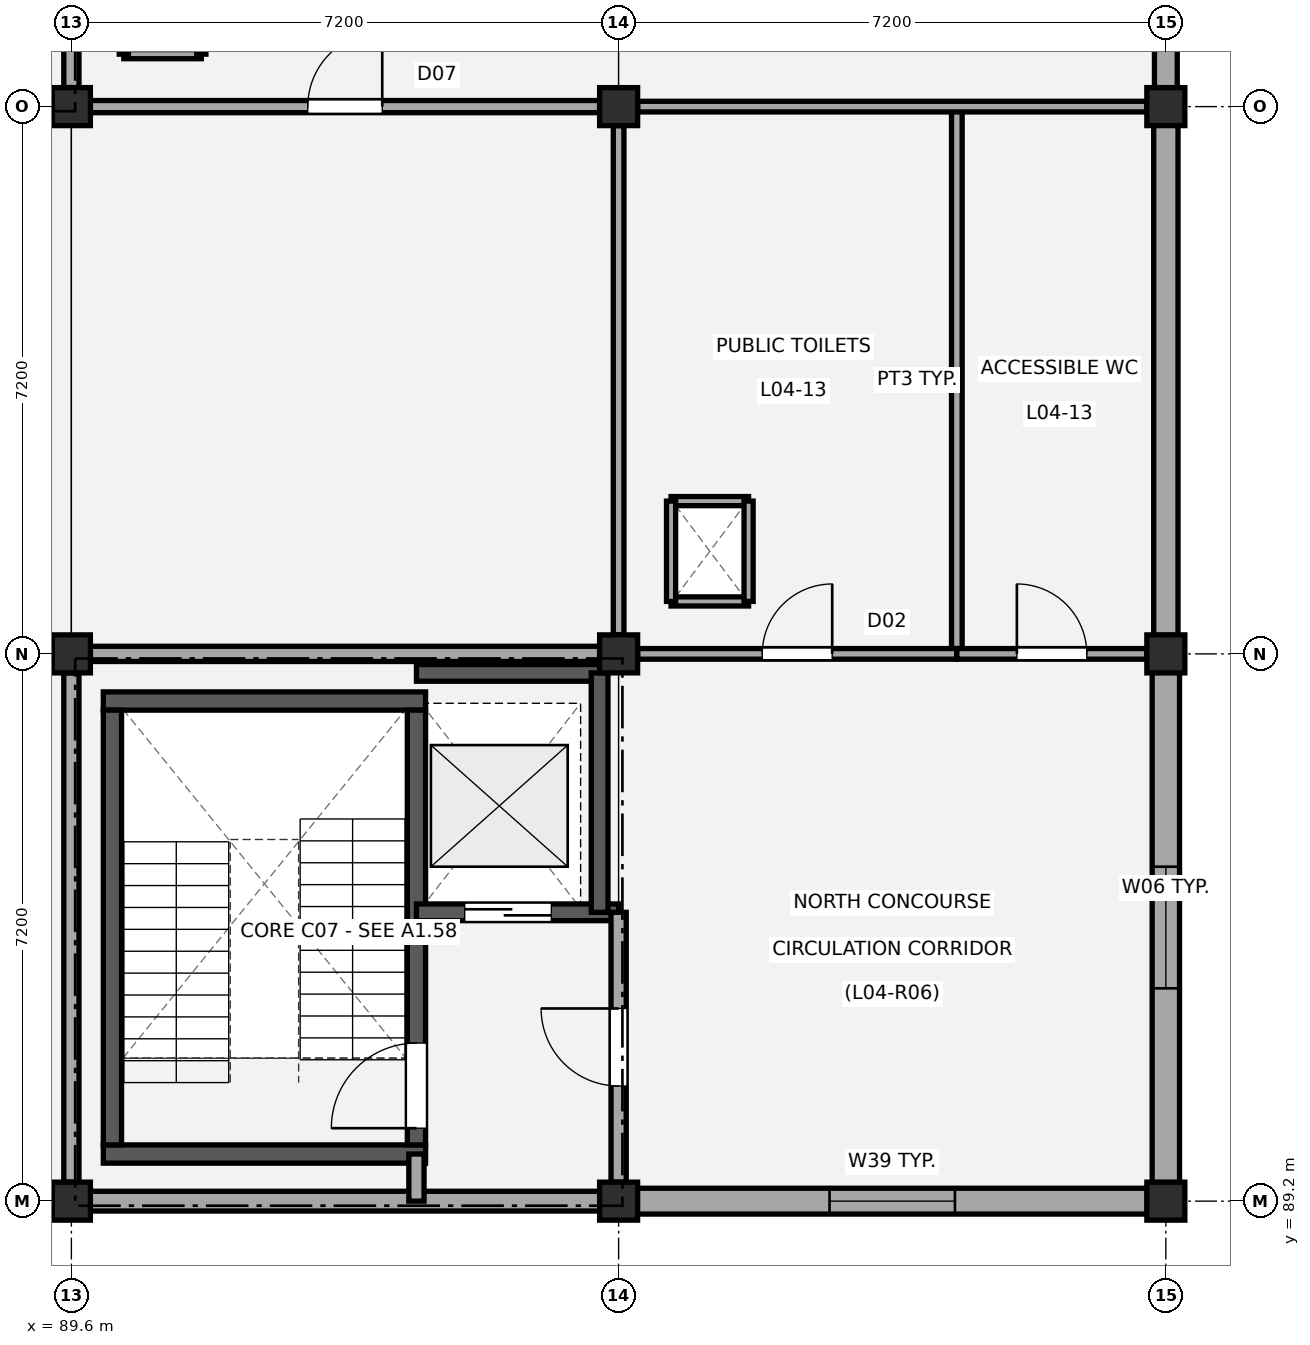
"""IFC4 building model, lengths in metres.
Left out: names, types, materials, properties, quantities, classifications, styles, units other than length and angle.
Written with IfcOpenShell. Run it as: python <this file> out.ifc"""

import sys

from ifc_helpers import new_model, si_unit, direction, frame, frame_2d, origin, origin_2d, place, context, subcontext, project, spatial, rectangle, extrude, element, fill, save


model = new_model("IFC4")
c1 = context("Model", 3, precision=1e-05, world=origin(), true_north=direction((0.0, 1.0)))
c2 = subcontext(c1, "Body", "Model", "MODEL_VIEW")
j1 = project(units=[si_unit("LENGTHUNIT", "METRE"), si_unit("PLANEANGLEUNIT", "RADIAN")], contexts=[c1])
p1 = place(None, origin())
s1 = spatial("IfcSite", under=j1, at=p1, CompositionType="ELEMENT")
p2 = place(p1, origin())
s2 = spatial("IfcBuilding", under=s1, at=p2, CompositionType="ELEMENT")
p3 = place(p2, frame((0.0, 0.0, 17.64)))
s3 = spatial("IfcBuildingStorey", under=s2, at=p3, CompositionType="ELEMENT", Elevation=17.64)
for number, where, z_axis, x_axis in (
    (1, (89.6, 89.2, 0.0), (0.0, 0.0, 1.0), (1.0, 0.0, 0.0)),
    (2, (89.6, 96.4, 0.0), (0.0, 0.0, 1.0), (1.0, 0.0, 0.0)),
    (3, (89.6, 103.6, 0.0), (0.0, 0.0, 1.0), (1.0, 0.0, 0.0)),
    (4, (96.8, 89.2, 0.0), (0.0, 0.0, 1.0), (1.0, 0.0, 0.0)),
    (5, (96.8, 96.4, 0.0), (0.0, 0.0, 1.0), (1.0, 0.0, 0.0)),
    (6, (96.8, 103.6, 0.0), (0.0, 0.0, 1.0), (1.0, 0.0, 0.0)),
    (7, (104.0, 89.2, 0.0), (0.0, 0.0, 1.0), (1.0, 0.0, 0.0)),
    (8, (104.0, 96.4, 0.0), (0.0, 0.0, 1.0), (1.0, 0.0, 0.0)),
    (9, (104.0, 103.6, 0.0), (0.0, 0.0, 1.0), (1.0, 0.0, 0.0)),
):
    element("IfcColumn", number, at=place(p3, frame(where, z_axis=z_axis, x_axis=x_axis)), inside=s3, PredefinedType="COLUMN", context=c2, shape_type="SweptSolid", body=[
        extrude(rectangle(XDim=0.5, YDim=0.5, at=origin_2d()), origin(), (0.0, 0.0, 1.0), 3.96),
    ])
p4 = place(p3, frame((89.355, 89.2, 0.0), z_axis=(0.0, 0.0, 1.0), x_axis=(-1.0, 0.0, 0.0)))
e10 = element("IfcWall", 10, at=p4, inside=s3, PredefinedType="STANDARD", context=c2, shape_type="SweptSolid", body=[
    extrude(rectangle(XDim=6.71, YDim=0.28, at=frame_2d((3.355, 0.0))), origin(), (0.0, 0.0, 1.0), 3.14),
])
p5 = place(p4, frame((2.63, 0.0, 0.95)))
e11 = element("IfcOpeningElement", 11, at=p5, cuts=e10, PredefinedType="OPENING", context=c2, shape_type="SweptSolid", body=[
    extrude(rectangle(XDim=1.45, YDim=1.8, at=frame_2d((0.725, 0.9))), frame((0.0, 0.15, 0.0), z_axis=(0.0, -1.0, 0.0), x_axis=(1.0, 0.0, 0.0)), (0.0, 0.0, 1.0), 0.3),
])
p6 = place(p3, frame((96.555, 89.2, 0.0), z_axis=(0.0, 0.0, 1.0), x_axis=(-1.0, 0.0, 0.0)))
e12 = element("IfcWall", 12, at=p6, inside=s3, PredefinedType="STANDARD", context=c2, shape_type="SweptSolid", body=[
    extrude(rectangle(XDim=6.71, YDim=0.26, at=frame_2d((3.355, 0.0))), origin(), (0.0, 0.0, 1.0), 3.12),
])
p7 = place(p3, frame((103.755, 89.2, 0.0), z_axis=(0.0, 0.0, 1.0), x_axis=(-1.0, 0.0, 0.0)))
e13 = element("IfcWall", 13, at=p7, inside=s3, PredefinedType="STANDARD", context=c2, shape_type="SweptSolid", body=[
    extrude(rectangle(XDim=6.71, YDim=0.34, at=frame_2d((3.355, 0.0))), origin(), (0.0, 0.0, 1.0), 3.14),
])
p8 = place(p7, frame((2.53, 0.0, 0.95)))
e14 = element("IfcOpeningElement", 14, at=p8, cuts=e13, PredefinedType="OPENING", context=c2, shape_type="SweptSolid", body=[
    extrude(rectangle(XDim=1.65, YDim=1.85, at=frame_2d((0.825, 0.925))), frame((0.0, 0.18, 0.0), z_axis=(0.0, -1.0, 0.0), x_axis=(1.0, 0.0, 0.0)), (0.0, 0.0, 1.0), 0.36),
])
p9 = place(p3, frame((104.0, 96.155, 0.0), z_axis=(0.0, 0.0, 1.0), x_axis=(0.0, -1.0, 0.0)))
e15 = element("IfcWall", 15, at=p9, inside=s3, PredefinedType="STANDARD", context=c2, shape_type="SweptSolid", body=[
    extrude(rectangle(XDim=6.71, YDim=0.36, at=frame_2d((3.355, 0.0))), origin(), (0.0, 0.0, 1.0), 3.14),
])
p10 = place(p9, frame((2.555, 0.0, 0.95)))
e16 = element("IfcOpeningElement", 16, at=p10, cuts=e15, PredefinedType="OPENING", context=c2, shape_type="SweptSolid", body=[
    extrude(rectangle(XDim=1.6, YDim=1.7, at=frame_2d((0.8, 0.85))), frame((0.0, 0.19, 0.0), z_axis=(0.0, -1.0, 0.0), x_axis=(1.0, 0.0, 0.0)), (0.0, 0.0, 1.0), 0.38),
])
p11 = place(p3, frame((104.0, 103.355, 0.0), z_axis=(0.0, 0.0, 1.0), x_axis=(0.0, -1.0, 0.0)))
e17 = element("IfcWall", 17, at=p11, inside=s3, PredefinedType="STANDARD", context=c2, shape_type="SweptSolid", body=[
    extrude(rectangle(XDim=6.71, YDim=0.32, at=frame_2d((3.355, 0.0))), origin(), (0.0, 0.0, 1.0), 3.14),
])
p12 = place(p3, frame((104.0, 111.88, 0.0), z_axis=(0.0, 0.0, 1.0), x_axis=(0.0, -1.0, 0.0)))
e18 = element("IfcWall", 18, at=p12, inside=s3, PredefinedType="STANDARD", context=c2, shape_type="SweptSolid", body=[
    extrude(rectangle(XDim=8.035, YDim=0.3, at=frame_2d((4.018, 0.0))), origin(), (0.0, 0.0, 1.0), 3.14),
])
p13 = place(p12, frame((3.167, 0.0, 0.95)))
e19 = element("IfcOpeningElement", 19, at=p13, cuts=e18, PredefinedType="OPENING", context=c2, shape_type="SweptSolid", body=[
    extrude(rectangle(XDim=1.7, YDim=1.75, at=frame_2d((0.85, 0.875))), frame((0.0, 0.16, 0.0), z_axis=(0.0, -1.0, 0.0), x_axis=(1.0, 0.0, 0.0)), (0.0, 0.0, 1.0), 0.32),
])
p14 = place(p3, frame((89.6, 103.85, 0.0), z_axis=(0.0, 0.0, 1.0), x_axis=(0.0, 1.0, 0.0)))
e20 = element("IfcWall", 20, at=p14, inside=s3, PredefinedType="PARTITIONING", context=c2, shape_type="SweptSolid", body=[
    extrude(rectangle(XDim=3.55, YDim=0.2, at=frame_2d((1.775, 0.0))), origin(), (0.0, 0.0, 1.0), 3.02),
])
p15 = place(p3, frame((86.94, 103.6, 0.0), z_axis=(0.0, 0.0, 1.0), x_axis=(1.0, 0.0, 0.0)))
e21 = element("IfcWall", 21, at=p15, inside=s3, PredefinedType="PARTITIONING", context=c2, shape_type="SweptSolid", body=[
    extrude(rectangle(XDim=2.41, YDim=0.2, at=frame_2d((1.205, 0.0))), origin(), (0.0, 0.0, 1.0), 3.09),
])
p16 = place(p15, frame((0.695, 0.0, 0.0)))
e22 = element("IfcOpeningElement", 22, at=p16, cuts=e21, PredefinedType="OPENING", context=c2, shape_type="SweptSolid", body=[
    extrude(rectangle(XDim=1.02, YDim=2.15, at=frame_2d((0.51, 1.075))), frame((0.0, 0.11, 0.0), z_axis=(0.0, -1.0, 0.0), x_axis=(1.0, 0.0, 0.0)), (0.0, 0.0, 1.0), 0.22),
])
for number, where, z_axis, x_axis in (
    (23, (90.02, 89.82, 0.0), (0.0, 0.0, 1.0), (1.0, 0.0, 0.0)),
    (24, (90.02, 95.78, 0.0), (0.0, 0.0, 1.0), (1.0, 0.0, 0.0)),
):
    element("IfcWall", number, at=place(p3, frame(where, z_axis=z_axis, x_axis=x_axis)), inside=s3, PredefinedType="SHEAR", context=c2, shape_type="SweptSolid", body=[
        extrude(rectangle(XDim=4.24, YDim=0.24, at=frame_2d((2.12, 0.0))), origin(), (0.0, 0.0, 1.0), 3.68),
    ])
p17 = place(p3, frame((90.14, 89.94, 0.0), z_axis=(0.0, 0.0, 1.0), x_axis=(0.0, 1.0, 0.0)))
e25 = element("IfcWall", 25, at=p17, inside=s3, PredefinedType="SHEAR", context=c2, shape_type="SweptSolid", body=[
    extrude(rectangle(XDim=5.72, YDim=0.24, at=frame_2d((2.86, 0.0))), origin(), (0.0, 0.0, 1.0), 3.68),
])
p18 = place(p3, frame((94.14, 89.94, 0.0), z_axis=(0.0, 0.0, 1.0), x_axis=(0.0, 1.0, 0.0)))
e26 = element("IfcWall", 26, at=p18, inside=s3, PredefinedType="SHEAR", context=c2, shape_type="SweptSolid", body=[
    extrude(rectangle(XDim=5.72, YDim=0.24, at=frame_2d((2.86, 0.0))), origin(), (0.0, 0.0, 1.0), 3.68),
])
p19 = place(p18, frame((0.22, 0.0, 0.0)))
e27 = element("IfcOpeningElement", 27, at=p19, cuts=e26, PredefinedType="OPENING", context=c2, shape_type="SweptSolid", body=[
    extrude(rectangle(XDim=1.12, YDim=2.15, at=frame_2d((0.56, 1.075))), frame((0.0, 0.13, 0.0), z_axis=(0.0, -1.0, 0.0), x_axis=(1.0, 0.0, 0.0)), (0.0, 0.0, 1.0), 0.26),
])
p20 = place(p3, frame((94.14, 93.0, 0.0), z_axis=(0.0, 0.0, 1.0), x_axis=(1.0, 0.0, 0.0)))
e28 = element("IfcWall", 28, at=p20, inside=s3, PredefinedType="SHEAR", context=c2, shape_type="SweptSolid", body=[
    extrude(rectangle(XDim=2.66, YDim=0.22, at=frame_2d((1.33, 0.0))), origin(), (0.0, 0.0, 1.0), 3.68),
])
p21 = place(p20, frame((0.635, 0.0, 0.0)))
e29 = element("IfcOpeningElement", 29, at=p21, cuts=e28, PredefinedType="OPENING", context=c2, shape_type="SweptSolid", body=[
    extrude(rectangle(XDim=1.14, YDim=2.15, at=frame_2d((0.57, 1.075))), frame((0.0, 0.12, 0.0), z_axis=(0.0, -1.0, 0.0), x_axis=(1.0, 0.0, 0.0)), (0.0, 0.0, 1.0), 0.24),
])
p22 = place(p3, frame((94.14, 96.15, 0.0), z_axis=(0.0, 0.0, 1.0), x_axis=(1.0, 0.0, 0.0)))
e30 = element("IfcWall", 30, at=p22, inside=s3, PredefinedType="SHEAR", context=c2, shape_type="SweptSolid", body=[
    extrude(rectangle(XDim=2.41, YDim=0.22, at=frame_2d((1.205, 0.0))), origin(), (0.0, 0.0, 1.0), 3.68),
])
p23 = place(p3, frame((96.55, 93.0, 0.0), z_axis=(0.0, 0.0, 1.0), x_axis=(0.0, 1.0, 0.0)))
e31 = element("IfcWall", 31, at=p23, inside=s3, PredefinedType="SHEAR", context=c2, shape_type="SweptSolid", body=[
    extrude(rectangle(XDim=3.15, YDim=0.22, at=frame_2d((1.575, 0.0))), origin(), (0.0, 0.0, 1.0), 3.68),
])
p24 = place(p3, frame((94.14, 89.2, 0.0), z_axis=(0.0, 0.0, 1.0), x_axis=(0.0, 1.0, 0.0)))
e32 = element("IfcWall", 32, at=p24, inside=s3, PredefinedType="PARTITIONING", context=c2, shape_type="SweptSolid", body=[
    extrude(rectangle(XDim=0.62, YDim=0.2, at=frame_2d((0.31, 0.0))), origin(), (0.0, 0.0, 1.0), 3.12),
])
p25 = place(p3, frame((89.6, 89.45, 0.0), z_axis=(0.0, 0.0, 1.0), x_axis=(0.0, 1.0, 0.0)))
e33 = element("IfcWall", 33, at=p25, inside=s3, PredefinedType="PARTITIONING", context=c2, shape_type="SweptSolid", body=[
    extrude(rectangle(XDim=6.7, YDim=0.2, at=frame_2d((3.35, 0.0))), origin(), (0.0, 0.0, 1.0), 3.02),
])
p26 = place(p3, frame((96.8, 89.45, 0.0), z_axis=(0.0, 0.0, 1.0), x_axis=(0.0, 1.0, 0.0)))
e34 = element("IfcWall", 34, at=p26, inside=s3, PredefinedType="PARTITIONING", context=c2, shape_type="SweptSolid", body=[
    extrude(rectangle(XDim=3.55, YDim=0.2, at=frame_2d((1.775, 0.0))), origin(), (0.0, 0.0, 1.0), 3.02),
])
p27 = place(p26, frame((1.265, 0.0, 0.0)))
e35 = element("IfcOpeningElement", 35, at=p27, cuts=e34, PredefinedType="OPENING", context=c2, shape_type="SweptSolid", body=[
    extrude(rectangle(XDim=1.02, YDim=2.15, at=frame_2d((0.51, 1.075))), frame((0.0, 0.11, 0.0), z_axis=(0.0, -1.0, 0.0), x_axis=(1.0, 0.0, 0.0)), (0.0, 0.0, 1.0), 0.22),
])
p28 = place(p3, frame((89.85, 96.4, 0.0), z_axis=(0.0, 0.0, 1.0), x_axis=(1.0, 0.0, 0.0)))
e36 = element("IfcWall", 36, at=p28, inside=s3, PredefinedType="PARTITIONING", context=c2, shape_type="SweptSolid", body=[
    extrude(rectangle(XDim=6.7, YDim=0.2, at=frame_2d((3.35, 0.0))), origin(), (0.0, 0.0, 1.0), 3.07),
])
p29 = place(p3, frame((90.29, 104.29, 0.0), z_axis=(0.0, 0.0, 1.0), x_axis=(1.0, 0.0, 0.0)))
e37 = element("IfcWall", 37, at=p29, inside=s3, PredefinedType="PARTITIONING", context=c2, shape_type="SweptSolid", body=[
    extrude(rectangle(XDim=1.02, YDim=0.12, at=frame_2d((0.51, 0.0))), origin(), (0.0, 0.0, 1.0), 3.66),
])
for number, where, z_axis, x_axis in (
    (38, (90.29, 104.29, 0.0), (0.0, 0.0, 1.0), (0.0, 1.0, 0.0)),
    (39, (91.31, 104.29, 0.0), (0.0, 0.0, 1.0), (0.0, 1.0, 0.0)),
):
    element("IfcWall", number, at=place(p3, frame(where, z_axis=z_axis, x_axis=x_axis)), inside=s3, PredefinedType="PARTITIONING", context=c2, shape_type="SweptSolid", body=[
        extrude(rectangle(XDim=1.32, YDim=0.12, at=frame_2d((0.66, 0.0))), origin(), (0.0, 0.0, 1.0), 3.66),
    ])
for number, where, z_axis, x_axis in (
    (40, (97.49, 97.09, 0.0), (0.0, 0.0, 1.0), (1.0, 0.0, 0.0)),
    (41, (97.49, 98.41, 0.0), (0.0, 0.0, 1.0), (1.0, 0.0, 0.0)),
):
    element("IfcWall", number, at=place(p3, frame(where, z_axis=z_axis, x_axis=x_axis)), inside=s3, PredefinedType="PARTITIONING", context=c2, shape_type="SweptSolid", body=[
        extrude(rectangle(XDim=1.02, YDim=0.12, at=frame_2d((0.51, 0.0))), origin(), (0.0, 0.0, 1.0), 3.68),
    ])
for number, where, z_axis, x_axis in (
    (42, (97.49, 97.09, 0.0), (0.0, 0.0, 1.0), (0.0, 1.0, 0.0)),
    (43, (98.51, 97.09, 0.0), (0.0, 0.0, 1.0), (0.0, 1.0, 0.0)),
):
    element("IfcWall", number, at=place(p3, frame(where, z_axis=z_axis, x_axis=x_axis)), inside=s3, PredefinedType="PARTITIONING", context=c2, shape_type="SweptSolid", body=[
        extrude(rectangle(XDim=1.32, YDim=0.12, at=frame_2d((0.66, 0.0))), origin(), (0.0, 0.0, 1.0), 3.68),
    ])
p30 = place(p3, frame((101.25, 96.4, 0.0), z_axis=(0.0, 0.0, 1.0), x_axis=(0.0, 1.0, 0.0)))
e44 = element("IfcWall", 44, at=p30, inside=s3, PredefinedType="PARTITIONING", context=c2, shape_type="SweptSolid", body=[
    extrude(rectangle(XDim=7.2, YDim=0.14, at=frame_2d((3.6, 0.0))), origin(), (0.0, 0.0, 1.0), 3.12),
])
p31 = place(p3, frame((97.05, 96.4, 0.0), z_axis=(0.0, 0.0, 1.0), x_axis=(1.0, 0.0, 0.0)))
e45 = element("IfcWall", 45, at=p31, inside=s3, PredefinedType="PARTITIONING", context=c2, shape_type="SweptSolid", body=[
    extrude(rectangle(XDim=4.2, YDim=0.14, at=frame_2d((2.1, 0.0))), origin(), (0.0, 0.0, 1.0), 3.04),
])
p32 = place(p31, frame((1.64, 0.0, 0.0)))
e46 = element("IfcOpeningElement", 46, at=p32, cuts=e45, PredefinedType="OPENING", context=c2, shape_type="SweptSolid", body=[
    extrude(rectangle(XDim=0.92, YDim=2.08, at=frame_2d((0.46, 1.04))), frame((0.0, 0.08, 0.0), z_axis=(0.0, -1.0, 0.0), x_axis=(1.0, 0.0, 0.0)), (0.0, 0.0, 1.0), 0.16),
])
p33 = place(p3, frame((101.25, 96.4, 0.0), z_axis=(0.0, 0.0, 1.0), x_axis=(1.0, 0.0, 0.0)))
e47 = element("IfcWall", 47, at=p33, inside=s3, PredefinedType="PARTITIONING", context=c2, shape_type="SweptSolid", body=[
    extrude(rectangle(XDim=2.5, YDim=0.14, at=frame_2d((1.25, 0.0))), origin(), (0.0, 0.0, 1.0), 3.04),
])
p34 = place(p33, frame((0.79, 0.0, 0.0)))
e48 = element("IfcOpeningElement", 48, at=p34, cuts=e47, PredefinedType="OPENING", context=c2, shape_type="SweptSolid", body=[
    extrude(rectangle(XDim=0.92, YDim=2.08, at=frame_2d((0.46, 1.04))), frame((0.0, 0.08, 0.0), z_axis=(0.0, -1.0, 0.0), x_axis=(1.0, 0.0, 0.0)), (0.0, 0.0, 1.0), 0.16),
])
p35 = place(p3, frame((97.05, 103.6, 0.0), z_axis=(0.0, 0.0, 1.0), x_axis=(1.0, 0.0, 0.0)))
e49 = element("IfcWall", 49, at=p35, inside=s3, PredefinedType="PARTITIONING", context=c2, shape_type="SweptSolid", body=[
    extrude(rectangle(XDim=6.7, YDim=0.14, at=frame_2d((3.35, 0.0))), origin(), (0.0, 0.0, 1.0), 3.09),
])
p36 = place(p3, frame((96.8, 96.65, 0.0), z_axis=(0.0, 0.0, 1.0), x_axis=(0.0, 1.0, 0.0)))
e50 = element("IfcWall", 50, at=p36, inside=s3, PredefinedType="PARTITIONING", context=c2, shape_type="SweptSolid", body=[
    extrude(rectangle(XDim=6.7, YDim=0.14, at=frame_2d((3.35, 0.0))), origin(), (0.0, 0.0, 1.0), 3.07),
])
p37 = place(p3, frame((89.85, 103.6, 0.0), z_axis=(0.0, 0.0, 1.0), x_axis=(1.0, 0.0, 0.0)))
e51 = element("IfcWall", 51, at=p37, inside=s3, PredefinedType="PARTITIONING", context=c2, shape_type="SweptSolid", body=[
    extrude(rectangle(XDim=6.7, YDim=0.16, at=frame_2d((3.35, 0.0))), origin(), (0.0, 0.0, 1.0), 3.02),
])
p38 = place(p37, frame((2.86, 0.0, 0.0)))
e52 = element("IfcOpeningElement", 52, at=p38, cuts=e51, PredefinedType="OPENING", context=c2, shape_type="SweptSolid", body=[
    extrude(rectangle(XDim=0.98, YDim=2.12, at=frame_2d((0.49, 1.06))), frame((0.0, 0.09, 0.0), z_axis=(0.0, -1.0, 0.0), x_axis=(1.0, 0.0, 0.0)), (0.0, 0.0, 1.0), 0.18),
])
p39 = place(p8, origin())
e53 = element("IfcWindow", 53, at=p39, inside=s3, PartitioningType="SINGLE_PANEL", PredefinedType="WINDOW", context=c2, shape_type="SweptSolid", body=[
    extrude(rectangle(XDim=1.65, YDim=1.85, at=frame_2d((0.825, 0.925))), frame((0.0, 0.03, 0.0), z_axis=(0.0, -1.0, 0.0), x_axis=(1.0, 0.0, 0.0)), (0.0, 0.0, 1.0), 0.06),
])
fill(e14, e53)
p40 = place(p10, origin())
e54 = element("IfcWindow", 54, at=p40, inside=s3, PartitioningType="SINGLE_PANEL", PredefinedType="WINDOW", context=c2, shape_type="SweptSolid", body=[
    extrude(rectangle(XDim=1.6, YDim=1.7, at=frame_2d((0.8, 0.85))), frame((0.0, 0.03, 0.0), z_axis=(0.0, -1.0, 0.0), x_axis=(1.0, 0.0, 0.0)), (0.0, 0.0, 1.0), 0.06),
])
fill(e16, e54)
p41 = place(p19, origin())
e55 = element("IfcDoor", 55, at=p41, inside=s3, OperationType="SINGLE_SWING_LEFT", PredefinedType="DOOR", context=c2, shape_type="SweptSolid", body=[
    extrude(rectangle(XDim=1.12, YDim=2.15, at=frame_2d((0.56, 1.075))), frame((0.0, 0.025, 0.0), z_axis=(0.0, -1.0, 0.0), x_axis=(1.0, 0.0, 0.0)), (0.0, 0.0, 1.0), 0.05),
])
fill(e27, e55)
p42 = place(p21, origin())
e56 = element("IfcDoor", 56, at=p42, inside=s3, OperationType="SLIDING_TO_LEFT", PredefinedType="DOOR", context=c2, shape_type="SweptSolid", body=[
    extrude(rectangle(XDim=1.14, YDim=2.15, at=frame_2d((0.57, 1.075))), frame((0.0, 0.025, 0.0), z_axis=(0.0, -1.0, 0.0), x_axis=(1.0, 0.0, 0.0)), (0.0, 0.0, 1.0), 0.05),
])
fill(e29, e56)
p43 = place(p27, origin())
e57 = element("IfcDoor", 57, at=p43, inside=s3, OperationType="SINGLE_SWING_RIGHT", PredefinedType="DOOR", context=c2, shape_type="SweptSolid", body=[
    extrude(rectangle(XDim=1.02, YDim=2.15, at=frame_2d((0.51, 1.075))), frame((0.0, 0.025, 0.0), z_axis=(0.0, -1.0, 0.0), x_axis=(1.0, 0.0, 0.0)), (0.0, 0.0, 1.0), 0.05),
])
fill(e35, e57)
p44 = place(p32, origin())
e58 = element("IfcDoor", 58, at=p44, inside=s3, OperationType="SINGLE_SWING_RIGHT", PredefinedType="DOOR", context=c2, shape_type="SweptSolid", body=[
    extrude(rectangle(XDim=0.92, YDim=2.08, at=frame_2d((0.46, 1.04))), frame((0.0, 0.025, 0.0), z_axis=(0.0, -1.0, 0.0), x_axis=(1.0, 0.0, 0.0)), (0.0, 0.0, 1.0), 0.05),
])
fill(e46, e58)
p45 = place(p34, origin())
e59 = element("IfcDoor", 59, at=p45, inside=s3, OperationType="SINGLE_SWING_LEFT", PredefinedType="DOOR", context=c2, shape_type="SweptSolid", body=[
    extrude(rectangle(XDim=0.92, YDim=2.08, at=frame_2d((0.46, 1.04))), frame((0.0, 0.025, 0.0), z_axis=(0.0, -1.0, 0.0), x_axis=(1.0, 0.0, 0.0)), (0.0, 0.0, 1.0), 0.05),
])
fill(e48, e59)
p46 = place(p38, origin())
e60 = element("IfcDoor", 60, at=p46, inside=s3, OperationType="SINGLE_SWING_RIGHT", PredefinedType="DOOR", context=c2, shape_type="SweptSolid", body=[
    extrude(rectangle(XDim=0.98, YDim=2.12, at=frame_2d((0.49, 1.06))), frame((0.0, 0.025, 0.0), z_axis=(0.0, -1.0, 0.0), x_axis=(1.0, 0.0, 0.0)), (0.0, 0.0, 1.0), 0.05),
])
fill(e52, e60)
save(model, sys.argv[1])
